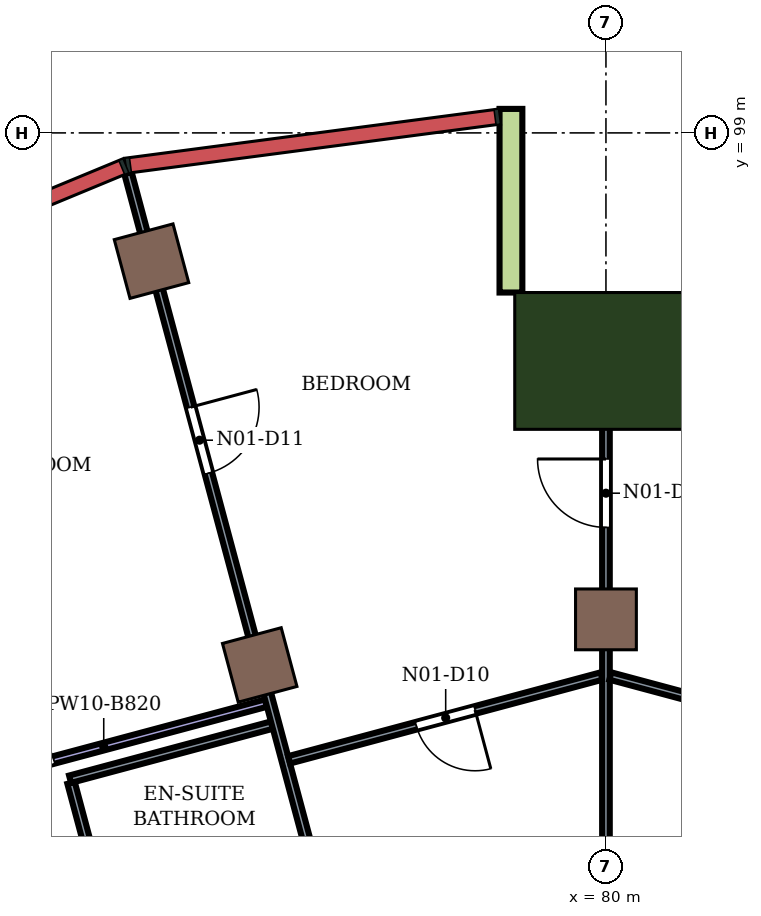
"""IFC4 building model, lengths in metres.
Left out: names, types, materials, properties, quantities, classifications, styles, units other than length and angle.
Written with IfcOpenShell. Run it as: python <this file> out.ifc"""

import sys

from ifc_helpers import new_model, si_unit, direction, frame, frame_2d, origin, origin_2d, place, context, subcontext, project, spatial, rectangle, extrude, element, fill, save


model = new_model("IFC4")
c1 = context("Model", 3, precision=1e-05, world=origin(), true_north=direction((0.0, 1.0)))
c2 = subcontext(c1, "Body", "Model", "MODEL_VIEW")
j1 = project(units=[si_unit("LENGTHUNIT", "METRE"), si_unit("PLANEANGLEUNIT", "RADIAN")], contexts=[c1])
p1 = place(None, origin())
s1 = spatial("IfcSite", under=j1, at=p1, CompositionType="ELEMENT")
p2 = place(p1, origin())
s2 = spatial("IfcBuilding", under=s1, at=p2, CompositionType="ELEMENT")
p3 = place(p2, frame((0.0, 0.0, 279.9)))
s3 = spatial("IfcBuildingStorey", under=s2, at=p3, CompositionType="ELEMENT", Elevation=279.9)
for number, where, z_axis, x_axis in (
    (1, (74.021, 97.313, 0.0), (0.0, 0.0, 1.0), (-0.259, 0.966, 0.0)),
    (2, (80.0, 92.6, 0.0), (0.0, 0.0, 1.0), (0.0, 1.0, 0.0)),
    (3, (75.445, 92.0, 0.0), (0.0, 0.0, 1.0), (-0.259, 0.966, 0.0)),
):
    element("IfcColumn", number, at=place(p3, frame(where, z_axis=z_axis, x_axis=x_axis)), inside=s3, PredefinedType="COLUMN", context=c2, shape_type="SweptSolid", body=[
        extrude(rectangle(XDim=0.8, YDim=0.8, at=origin_2d()), origin(), (0.0, 0.0, 1.0), 4.2),
    ])
p4 = place(p3, frame((80.0, 96.0, 0.0), z_axis=(0.0, 0.0, 1.0), x_axis=(0.0, 1.0, 0.0)))
e4 = element("IfcColumn", 4, at=p4, inside=s3, PredefinedType="COLUMN", context=c2, shape_type="SweptSolid", body=[
    extrude(rectangle(XDim=1.8, YDim=2.4, at=origin_2d()), origin(), (0.0, 0.0, 1.0), 4.2),
])
p5 = place(p3, frame((78.75, 96.9, 0.0), z_axis=(0.0, 0.0, 1.0), x_axis=(0.0, 1.0, 0.0)))
e5 = element("IfcWall", 5, at=p5, inside=s3, PredefinedType="NOTDEFINED", context=c2, shape_type="SweptSolid", body=[
    extrude(rectangle(XDim=2.416, YDim=0.3, at=frame_2d((1.208, 0.0))), origin(), (0.0, 0.0, 1.0), 4.2),
])
p6 = place(p3, frame((67.852, 96.042, 0.0), z_axis=(0.0, 0.0, 1.0), x_axis=(0.499960582802, -0.866048160118, 0.0)))
e6 = element("IfcWall", 6, at=p6, inside=s3, PredefinedType="PARTITIONING", context=c2, shape_type="SweptSolid", body=[
    extrude(rectangle(XDim=10.946, YDim=0.2, at=frame_2d((5.473, 0.0))), origin(), (0.0, 0.0, 1.0), 3.75),
])
p7 = place(p3, frame((71.258, 90.354, 0.0), z_axis=(0.0, 0.0, 1.0), x_axis=(0.965955692548, 0.258707556973, 0.0)))
e7 = element("IfcWall", 7, at=p7, inside=s3, PredefinedType="PARTITIONING", context=c2, shape_type="SweptSolid", body=[
    extrude(rectangle(XDim=4.42, YDim=0.1, at=frame_2d((2.21, 0.0))), origin(), (0.0, 0.0, 1.0), 3.38),
])
p8 = place(p7, frame((0.73, 0.0, 0.0)))
e8 = element("IfcOpeningElement", 8, at=p8, cuts=e7, PredefinedType="OPENING", context=c2, shape_type="SweptSolid", body=[
    extrude(rectangle(XDim=0.8, YDim=2.1, at=frame_2d((0.4, 1.05))), frame((0.0, 0.06, 0.0), z_axis=(0.0, -1.0, 0.0), x_axis=(1.0, 0.0, 0.0)), (0.0, 0.0, 1.0), 0.12),
])
p9 = place(p3, frame((72.963, 90.449, 0.0), z_axis=(0.0, 0.0, 1.0), x_axis=(0.25854689918, -0.965998706482, 0.0)))
e9 = element("IfcWall", 9, at=p9, inside=s3, PredefinedType="PARTITIONING", context=c2, shape_type="SweptSolid", body=[
    extrude(rectangle(XDim=3.849, YDim=0.1, at=frame_2d((1.924, 0.0))), origin(), (0.0, 0.0, 1.0), 3.75),
])
p10 = place(p9, frame((1.55, 0.0, 0.0)))
e10 = element("IfcOpeningElement", 10, at=p10, cuts=e9, PredefinedType="OPENING", context=c2, shape_type="SweptSolid", body=[
    extrude(rectangle(XDim=0.8, YDim=2.1, at=frame_2d((0.4, 1.05))), frame((0.0, 0.06, 0.0), z_axis=(0.0, -1.0, 0.0), x_axis=(1.0, 0.0, 0.0)), (0.0, 0.0, 1.0), 0.12),
])
p11 = place(p3, frame((72.95, 90.497, 0.0), z_axis=(0.0, 0.0, 1.0), x_axis=(0.96588619323, 0.258966912418, 0.0)))
e11 = element("IfcWall", 11, at=p11, inside=s3, PredefinedType="PARTITIONING", context=c2, shape_type="SweptSolid", body=[
    extrude(rectangle(XDim=2.749, YDim=0.1, at=frame_2d((1.375, 0.0))), origin(), (0.0, 0.0, 1.0), 3.75),
])
p12 = place(p3, frame((73.712, 98.47, 0.0), z_axis=(0.0, 0.0, 1.0), x_axis=(0.258727167471, -0.965950440143, 0.0)))
e12 = element("IfcWall", 12, at=p12, inside=s3, PredefinedType="PARTITIONING", context=c2, shape_type="SweptSolid", body=[
    extrude(rectangle(XDim=11.404, YDim=0.1, at=frame_2d((5.702, 0.0))), origin(), (0.0, 0.0, 1.0), 3.75),
])
p13 = place(p12, frame((3.187, 0.0, 0.0)))
e13 = element("IfcOpeningElement", 13, at=p13, cuts=e12, PredefinedType="OPENING", context=c2, shape_type="SweptSolid", body=[
    extrude(rectangle(XDim=0.9, YDim=2.1, at=frame_2d((0.45, 1.05))), frame((0.0, 0.06, 0.0), z_axis=(0.0, -1.0, 0.0), x_axis=(1.0, 0.0, 0.0)), (0.0, 0.0, 1.0), 0.12),
])
p14 = place(p3, frame((75.832, 90.752, 0.0), z_axis=(0.0, 0.0, 1.0), x_axis=(0.965856843682, 0.259076354601, 0.0)))
e14 = element("IfcWall", 14, at=p14, inside=s3, PredefinedType="PARTITIONING", context=c2, shape_type="SweptSolid", body=[
    extrude(rectangle(XDim=4.256, YDim=0.1, at=frame_2d((2.128, 0.0))), origin(), (0.0, 0.0, 1.0), 3.75),
])
p15 = place(p14, frame((1.733, 0.0, 0.0)))
e15 = element("IfcOpeningElement", 15, at=p15, cuts=e14, PredefinedType="OPENING", context=c2, shape_type="SweptSolid", body=[
    extrude(rectangle(XDim=0.8, YDim=2.1, at=frame_2d((0.4, 1.05))), frame((0.0, 0.06, 0.0), z_axis=(0.0, -1.0, 0.0), x_axis=(1.0, 0.0, 0.0)), (0.0, 0.0, 1.0), 0.12),
])
p16 = place(p3, frame((80.0, 88.246, 0.0), z_axis=(0.0, 0.0, 1.0), x_axis=(0.0, 1.0, 0.0)))
e16 = element("IfcWall", 16, at=p16, inside=s3, PredefinedType="PARTITIONING", context=c2, shape_type="SweptSolid", body=[
    extrude(rectangle(XDim=8.454, YDim=0.1, at=frame_2d((4.227, 0.0))), origin(), (0.0, 0.0, 1.0), 3.75),
])
p17 = place(p16, frame((5.564, 0.0, 0.0)))
e17 = element("IfcOpeningElement", 17, at=p17, cuts=e16, PredefinedType="OPENING", context=c2, shape_type="SweptSolid", body=[
    extrude(rectangle(XDim=0.9, YDim=2.1, at=frame_2d((0.45, 1.05))), frame((0.0, 0.06, 0.0), z_axis=(0.0, -1.0, 0.0), x_axis=(1.0, 0.0, 0.0)), (0.0, 0.0, 1.0), 0.12),
])
p18 = place(p3, frame((80.058, 91.854, 0.0), z_axis=(0.0, 0.0, 1.0), x_axis=(0.96586069397, -0.259061999998, 0.0)))
e18 = element("IfcWall", 18, at=p18, inside=s3, PredefinedType="PARTITIONING", context=c2, shape_type="SweptSolid", body=[
    extrude(rectangle(XDim=4.256, YDim=0.1, at=frame_2d((2.128, 0.0))), origin(), (0.0, 0.0, 1.0), 3.75),
])
p19 = place(p17, origin())
e19 = element("IfcDoor", 19, at=p19, inside=s3, OperationType="SINGLE_SWING_RIGHT", PredefinedType="DOOR", context=c2, shape_type="SweptSolid", body=[
    extrude(rectangle(XDim=0.9, YDim=2.1, at=frame_2d((0.45, 1.05))), frame((0.0, 0.025, 0.0), z_axis=(0.0, -1.0, 0.0), x_axis=(1.0, 0.0, 0.0)), (0.0, 0.0, 1.0), 0.05),
])
fill(e17, e19)
p20 = place(p15, frame((0.8, 0.0, 0.0), z_axis=(0.0, 0.0, 1.0), x_axis=(-1.0, 0.0, 0.0)))
e20 = element("IfcDoor", 20, at=p20, inside=s3, OperationType="SINGLE_SWING_LEFT", PredefinedType="DOOR", context=c2, shape_type="SweptSolid", body=[
    extrude(rectangle(XDim=0.8, YDim=2.1, at=frame_2d((0.4, 1.05))), frame((0.0, 0.025, 0.0), z_axis=(0.0, -1.0, 0.0), x_axis=(1.0, 0.0, 0.0)), (0.0, 0.0, 1.0), 0.05),
])
fill(e15, e20)
p21 = place(p13, origin())
e21 = element("IfcDoor", 21, at=p21, inside=s3, OperationType="SINGLE_SWING_LEFT", PredefinedType="DOOR", context=c2, shape_type="SweptSolid", body=[
    extrude(rectangle(XDim=0.9, YDim=2.1, at=frame_2d((0.45, 1.05))), frame((0.0, 0.025, 0.0), z_axis=(0.0, -1.0, 0.0), x_axis=(1.0, 0.0, 0.0)), (0.0, 0.0, 1.0), 0.05),
])
fill(e13, e21)
p22 = place(p8, origin())
e22 = element("IfcDoor", 22, at=p22, inside=s3, OperationType="SINGLE_SWING_LEFT", PredefinedType="DOOR", context=c2, shape_type="SweptSolid", body=[
    extrude(rectangle(XDim=0.8, YDim=2.1, at=frame_2d((0.4, 1.05))), frame((0.0, 0.025, 0.0), z_axis=(0.0, -1.0, 0.0), x_axis=(1.0, 0.0, 0.0)), (0.0, 0.0, 1.0), 0.05),
])
fill(e8, e22)
save(model, sys.argv[1])
